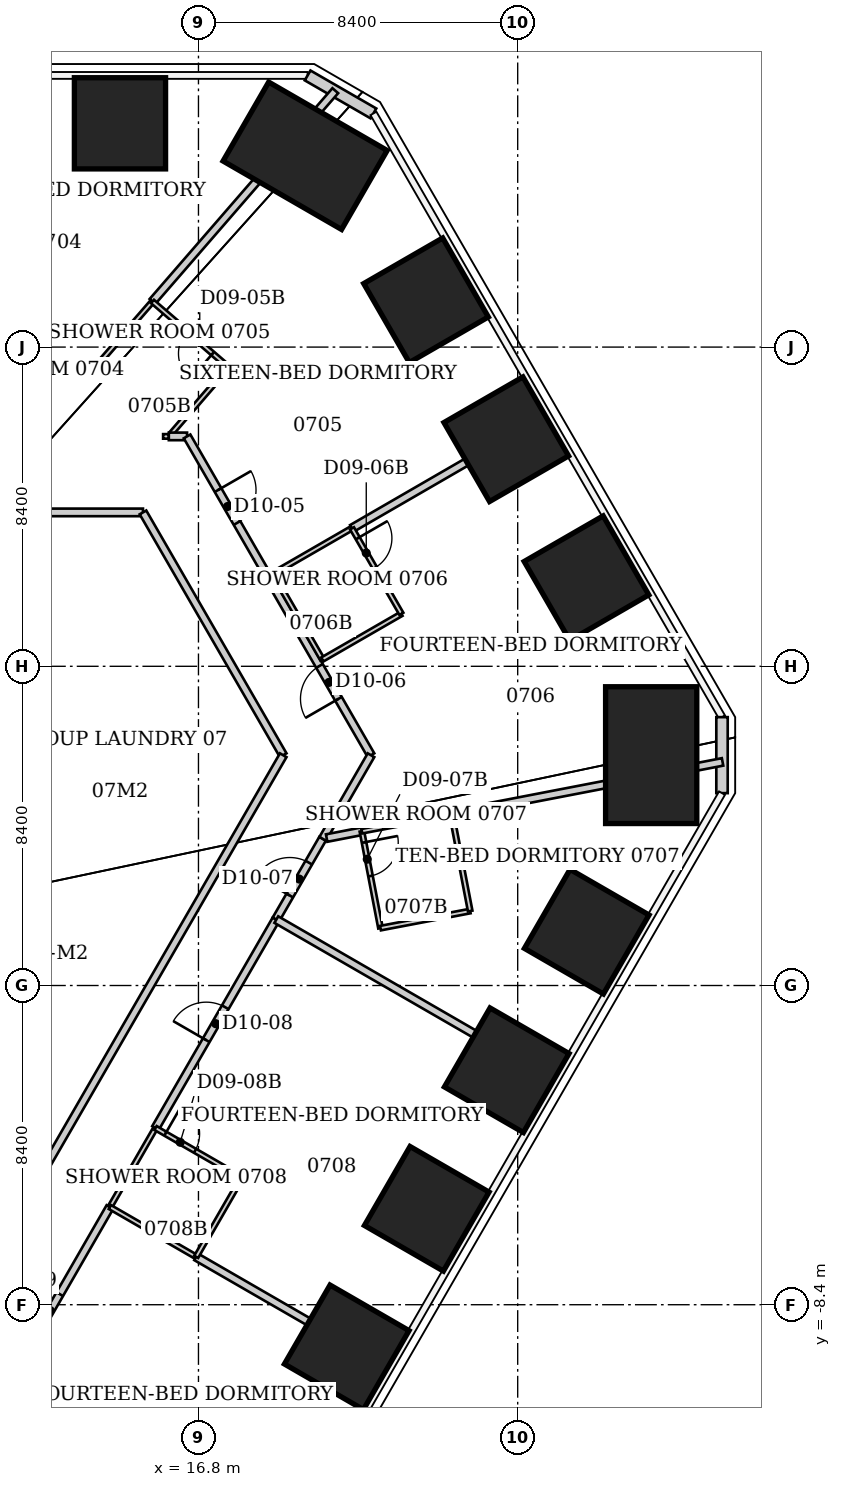
"""IFC4 building model, lengths in metres.
Left out: names, types, materials, properties, quantities, classifications, styles, units other than length and angle.
Written with IfcOpenShell. Run it as: python <this file> out.ifc"""

import sys

from ifc_helpers import new_model, si_unit, direction, frame, frame_2d, origin, origin_2d, place, context, subcontext, project, spatial, rectangle, extrude, element, fill, save


model = new_model("IFC4")
c1 = context("Model", 3, precision=1e-05, world=origin(), true_north=direction((0.0, 1.0)))
c2 = subcontext(c1, "Body", "Model", "MODEL_VIEW")
j1 = project(units=[si_unit("LENGTHUNIT", "METRE"), si_unit("PLANEANGLEUNIT", "RADIAN")], contexts=[c1])
p1 = place(None, origin())
s1 = spatial("IfcSite", under=j1, at=p1, CompositionType="ELEMENT")
p2 = place(p1, origin())
s2 = spatial("IfcBuilding", under=s1, at=p2, CompositionType="ELEMENT")
p3 = place(p2, frame((0.0, 0.0, 34.4)))
s3 = spatial("IfcBuildingStorey", under=s2, at=p3, CompositionType="ELEMENT", Elevation=34.4)
p4 = place(p3, frame((14.735, 22.689, 0.0), z_axis=(0.0, 0.0, 1.0), x_axis=(0.0, 1.0, 0.0)))
e1 = element("IfcColumn", 1, at=p4, inside=s3, PredefinedType="COLUMN", context=c2, shape_type="SweptSolid", body=[
    extrude(rectangle(XDim=2.4, YDim=2.4, at=origin_2d()), origin(), (0.0, 0.0, 1.0), 3.8),
])
p5 = place(p3, frame((19.606, 21.835, 0.0), z_axis=(0.0, 0.0, 1.0), x_axis=(0.5, 0.866025403784, 0.0)))
e2 = element("IfcColumn", 2, at=p5, inside=s3, PredefinedType="COLUMN", context=c2, shape_type="SweptSolid", body=[
    extrude(rectangle(XDim=2.4, YDim=3.6, at=origin_2d()), origin(), (0.0, 0.0, 1.0), 3.8),
])
for number, where, z_axis, x_axis in (
    (3, (22.788, 18.032, 0.0), (0.0, 0.0, 1.0), (0.866, 0.5, 0.0)),
    (4, (24.899, 14.375, 0.0), (0.0, 0.0, 1.0), (0.866, 0.5, 0.0)),
    (5, (27.01, 10.719, 0.0), (0.0, 0.0, 1.0), (0.866, 0.5, 0.0)),
):
    element("IfcColumn", number, at=place(p3, frame(where, z_axis=z_axis, x_axis=x_axis)), inside=s3, PredefinedType="COLUMN", context=c2, shape_type="SweptSolid", body=[
        extrude(rectangle(XDim=2.4, YDim=2.4, at=origin_2d()), origin(), (0.0, 0.0, 1.0), 3.8),
    ])
p6 = place(p3, frame((28.713, 6.062, 0.0), z_axis=(0.0, 0.0, 1.0), x_axis=(1.0, 0.0, 0.0)))
e6 = element("IfcColumn", 6, at=p6, inside=s3, PredefinedType="COLUMN", context=c2, shape_type="SweptSolid", body=[
    extrude(rectangle(XDim=2.4, YDim=3.6, at=origin_2d()), origin(), (0.0, 0.0, 1.0), 3.8),
])
for number, where, z_axis, x_axis in (
    (7, (27.016, 1.416, 0.0), (0.0, 0.0, 1.0), (0.866, -0.5, 0.0)),
    (8, (24.911, -2.23, 0.0), (0.0, 0.0, 1.0), (0.866, -0.5, 0.0)),
    (9, (22.806, -5.875, 0.0), (0.0, 0.0, 1.0), (0.866, -0.5, 0.0)),
    (10, (20.701, -9.521, 0.0), (0.0, 0.0, 1.0), (0.866, -0.5, 0.0)),
):
    element("IfcColumn", number, at=place(p3, frame(where, z_axis=z_axis, x_axis=x_axis)), inside=s3, PredefinedType="COLUMN", context=c2, shape_type="SweptSolid", body=[
        extrude(rectangle(XDim=2.4, YDim=2.4, at=origin_2d()), origin(), (0.0, 0.0, 1.0), 3.8),
    ])
for number, where, z_axis, x_axis in (
    (11, (19.672, 23.949, 0.0), (0.0, 0.0, 1.0), (0.866, -0.5, 0.0)),
    (12, (30.576, 7.062, 0.0), (0.0, 0.0, 1.0), (0.0, -1.0, 0.0)),
):
    element("IfcWall", number, at=place(p3, frame(where, z_axis=z_axis, x_axis=x_axis)), inside=s3, PredefinedType="SOLIDWALL", context=c2, shape_type="SweptSolid", body=[
        extrude(rectangle(XDim=2.0, YDim=0.3, at=frame_2d((1.0, 0.0))), origin(), (0.0, 0.0, 1.0), 3.64),
    ])
p7 = place(p3, frame((0.15, 12.45, 0.0), z_axis=(0.0, 0.0, 1.0), x_axis=(1.0, 0.0, 0.0)))
e13 = element("IfcWall", 13, at=p7, inside=s3, PredefinedType="PARTITIONING", context=c2, shape_type="SweptSolid", body=[
    extrude(rectangle(XDim=15.19, YDim=0.2, at=frame_2d((7.595, 0.0))), origin(), (0.0, 0.0, 1.0), 3.64),
])
p8 = place(p3, frame((11.33, -11.28, 0.0), z_axis=(0.0, 0.0, 1.0), x_axis=(0.499208241022, 0.866482043724, 0.0)))
e14 = element("IfcWall", 14, at=p8, inside=s3, PredefinedType="PARTITIONING", context=c2, shape_type="SweptSolid", body=[
    extrude(rectangle(XDim=6.29, YDim=0.2, at=frame_2d((3.145, 0.0))), origin(), (0.0, 0.0, 1.0), 3.64),
])
p9 = place(p8, frame((2.645, 0.0, 0.0)))
e15 = element("IfcOpeningElement", 15, at=p9, cuts=e14, PredefinedType="OPENING", context=c2, shape_type="SweptSolid", body=[
    extrude(rectangle(XDim=1.0, YDim=2.13, at=frame_2d((0.5, 1.065))), frame((0.0, 0.1, 0.0), z_axis=(0.0, -1.0, 0.0), x_axis=(1.0, 0.0, 0.0)), (0.0, 0.0, 1.0), 0.2),
])
p10 = place(p3, frame((13.95, 16.11, 0.0), z_axis=(0.0, 0.0, 1.0), x_axis=(0.655390967201, 0.75528979876, 0.0)))
e16 = element("IfcWall", 16, at=p10, inside=s3, PredefinedType="PARTITIONING", context=c2, shape_type="SweptSolid", body=[
    extrude(rectangle(XDim=2.502, YDim=0.12, at=frame_2d((1.251, 0.0))), origin(), (0.0, 0.0, 1.0), 3.64),
])
p11 = place(p3, frame((14.47, -5.83, 0.0), z_axis=(0.0, 0.0, 1.0), x_axis=(0.499693115345, 0.866202511239, 0.0)))
e17 = element("IfcWall", 17, at=p11, inside=s3, PredefinedType="PARTITIONING", context=c2, shape_type="SweptSolid", body=[
    extrude(rectangle(XDim=2.401, YDim=0.12, at=frame_2d((1.201, 0.0))), origin(), (0.0, 0.0, 1.0), 3.64),
])
p12 = place(p3, frame((14.47, -5.83, 0.0), z_axis=(0.0, 0.0, 1.0), x_axis=(0.866010296064, -0.500026166427, 0.0)))
e18 = element("IfcWall", 18, at=p12, inside=s3, PredefinedType="PARTITIONING", context=c2, shape_type="SweptSolid", body=[
    extrude(rectangle(XDim=2.621, YDim=0.12, at=frame_2d((1.311, 0.0))), origin(), (0.0, 0.0, 1.0), 3.023),
])
p13 = place(p3, frame((15.34, 12.45, 0.0), z_axis=(0.0, 0.0, 1.0), x_axis=(0.500074726567, -0.865982256082, 0.0)))
e19 = element("IfcWall", 19, at=p13, inside=s3, PredefinedType="PARTITIONING", context=c2, shape_type="SweptSolid", body=[
    extrude(rectangle(XDim=7.379, YDim=0.2, at=frame_2d((3.689, 0.0))), origin(), (0.0, 0.0, 1.0), 3.64),
])
p14 = place(p3, frame((15.59, 18.0, 0.0), z_axis=(0.0, 0.0, 1.0), x_axis=(0.655131789558, 0.755514618197, 0.0)))
e20 = element("IfcWall", 20, at=p14, inside=s3, PredefinedType="PARTITIONING", context=c2, shape_type="SweptSolid", body=[
    extrude(rectangle(XDim=7.343, YDim=0.2, at=frame_2d((3.671, 0.0))), origin(), (0.0, 0.0, 1.0), 3.64),
])
p15 = place(p3, frame((15.67, -3.75, 0.0), z_axis=(0.0, 0.0, 1.0), x_axis=(0.500061360627, 0.865989974311, 0.0)))
e21 = element("IfcWall", 21, at=p15, inside=s3, PredefinedType="PARTITIONING", context=c2, shape_type="SweptSolid", body=[
    extrude(rectangle(XDim=6.34, YDim=0.2, at=frame_2d((3.17, 0.0))), origin(), (0.0, 0.0, 1.0), 3.64),
])
p16 = place(p15, frame((2.67, 0.0, 0.0)))
e22 = element("IfcOpeningElement", 22, at=p16, cuts=e21, PredefinedType="OPENING", context=c2, shape_type="SweptSolid", body=[
    extrude(rectangle(XDim=1.0, YDim=2.13, at=frame_2d((0.5, 1.065))), frame((0.0, 0.1, 0.0), z_axis=(0.0, -1.0, 0.0), x_axis=(1.0, 0.0, 0.0)), (0.0, 0.0, 1.0), 0.2),
])
p17 = place(p3, frame((16.02, 14.45, 0.0), z_axis=(0.0, 0.0, 1.0), x_axis=(-1.0, 0.0, 0.0)))
e23 = element("IfcWall", 23, at=p17, inside=s3, PredefinedType="PARTITIONING", context=c2, shape_type="SweptSolid", body=[
    extrude(rectangle(XDim=0.15, YDim=0.12, at=frame_2d((0.075, 0.0))), origin(), (0.0, 0.0, 1.0), 3.64),
])
p18 = place(p3, frame((16.082, 14.522, 0.0), z_axis=(0.0, 0.0, 1.0), x_axis=(0.653217802971, 0.757170061401, 0.0)))
e24 = element("IfcWall", 24, at=p18, inside=s3, PredefinedType="PARTITIONING", context=c2, shape_type="SweptSolid", body=[
    extrude(rectangle(XDim=2.309, YDim=0.12, at=frame_2d((1.154, 0.0))), origin(), (0.0, 0.0, 1.0), 3.64),
])
p19 = place(p3, frame((16.5, 14.45, 0.0), z_axis=(0.0, 0.0, 1.0), x_axis=(-1.0, 0.0, 0.0)))
e25 = element("IfcWall", 25, at=p19, inside=s3, PredefinedType="PARTITIONING", context=c2, shape_type="SweptSolid", body=[
    extrude(rectangle(XDim=0.48, YDim=0.2, at=frame_2d((0.24, 0.0))), origin(), (0.0, 0.0, 1.0), 3.64),
])
p20 = place(p3, frame((16.5, 14.45, 0.0), z_axis=(0.0, 0.0, 1.0), x_axis=(0.499689380994, -0.866204665493, 0.0)))
e26 = element("IfcWall", 26, at=p20, inside=s3, PredefinedType="PARTITIONING", context=c2, shape_type="SweptSolid", body=[
    extrude(rectangle(XDim=4.26, YDim=0.2, at=frame_2d((2.13, 0.0))), origin(), (0.0, 0.0, 1.0), 3.64),
])
p21 = place(p20, frame((1.63, 0.0, 0.0)))
e27 = element("IfcOpeningElement", 27, at=p21, cuts=e26, PredefinedType="OPENING", context=c2, shape_type="SweptSolid", body=[
    extrude(rectangle(XDim=1.0, YDim=2.13, at=frame_2d((0.5, 1.065))), frame((0.0, 0.1, 0.0), z_axis=(0.0, -1.0, 0.0), x_axis=(1.0, 0.0, 0.0)), (0.0, 0.0, 1.0), 0.2),
])
p22 = place(p3, frame((16.74, -7.141, 0.0), z_axis=(0.0, 0.0, 1.0), x_axis=(0.865985044037, -0.500069898618, 0.0)))
e28 = element("IfcWall", 28, at=p22, inside=s3, PredefinedType="PARTITIONING", context=c2, shape_type="SweptSolid", body=[
    extrude(rectangle(XDim=5.758, YDim=0.2, at=frame_2d((2.879, 0.0))), origin(), (0.0, 0.0, 1.0), 3.023),
])
p23 = place(p3, frame((16.74, -7.14, 0.0), z_axis=(0.0, 0.0, 1.0), x_axis=(0.499737123639, 0.866177122335, 0.0)))
e29 = element("IfcWall", 29, at=p23, inside=s3, PredefinedType="PARTITIONING", context=c2, shape_type="SweptSolid", body=[
    extrude(rectangle(XDim=2.401, YDim=0.12, at=frame_2d((1.201, 0.0))), origin(), (0.0, 0.0, 1.0), 3.64),
])
p24 = place(p3, frame((17.59, 16.27, 0.0), z_axis=(0.0, 0.0, 1.0), x_axis=(-0.756316256301, 0.6542061758, 0.0)))
e30 = element("IfcWall", 30, at=p24, inside=s3, PredefinedType="PARTITIONING", context=c2, shape_type="SweptSolid", body=[
    extrude(rectangle(XDim=2.644, YDim=0.12, at=frame_2d((1.322, 0.0))), origin(), (0.0, 0.0, 1.0), 3.64),
])
p25 = place(p24, frame((0.55, 0.0, 0.0)))
e31 = element("IfcOpeningElement", 31, at=p25, cuts=e30, PredefinedType="OPENING", context=c2, shape_type="SweptSolid", body=[
    extrude(rectangle(XDim=0.9, YDim=2.03, at=frame_2d((0.45, 1.015))), frame((0.0, 0.06, 0.0), z_axis=(0.0, -1.0, 0.0), x_axis=(1.0, 0.0, 0.0)), (0.0, 0.0, 1.0), 0.12),
])
p26 = place(p3, frame((17.94, -5.06, 0.0), z_axis=(0.0, 0.0, 1.0), x_axis=(-0.866114241029, 0.499846097802, 0.0)))
e32 = element("IfcWall", 32, at=p26, inside=s3, PredefinedType="PARTITIONING", context=c2, shape_type="SweptSolid", body=[
    extrude(rectangle(XDim=2.621, YDim=0.12, at=frame_2d((1.311, 0.0))), origin(), (0.0, 0.0, 1.0), 3.64),
])
p27 = place(p26, frame((1.421, 0.0, 0.0)))
e33 = element("IfcOpeningElement", 33, at=p27, cuts=e32, PredefinedType="OPENING", context=c2, shape_type="SweptSolid", body=[
    extrude(rectangle(XDim=0.9, YDim=2.03, at=frame_2d((0.45, 1.015))), frame((0.0, 0.06, 0.0), z_axis=(0.0, -1.0, 0.0), x_axis=(1.0, 0.0, 0.0)), (0.0, 0.0, 1.0), 0.12),
])
p28 = place(p3, frame((18.629, 10.76, 0.0), z_axis=(0.0, 0.0, 1.0), x_axis=(0.499715960807, -0.866189331794, 0.0)))
e34 = element("IfcWall", 34, at=p28, inside=s3, PredefinedType="PARTITIONING", context=c2, shape_type="SweptSolid", body=[
    extrude(rectangle(XDim=5.426, YDim=0.2, at=frame_2d((2.713, 0.0))), origin(), (0.0, 0.0, 1.0), 3.64),
])
p29 = place(p28, frame((2.713, 0.0, 0.0)))
e35 = element("IfcOpeningElement", 35, at=p29, cuts=e34, PredefinedType="OPENING", context=c2, shape_type="SweptSolid", body=[
    extrude(rectangle(XDim=1.0, YDim=2.13, at=frame_2d((0.5, 1.065))), frame((0.0, 0.1, 0.0), z_axis=(0.0, -1.0, 0.0), x_axis=(1.0, 0.0, 0.0)), (0.0, 0.0, 1.0), 0.2),
])
p30 = place(p3, frame((18.639, 10.765, 0.0), z_axis=(0.0, 0.0, 1.0), x_axis=(0.865830913258, 0.500336716268, 0.0)))
e36 = element("IfcWall", 36, at=p30, inside=s3, PredefinedType="PARTITIONING", context=c2, shape_type="SweptSolid", body=[
    extrude(rectangle(XDim=0.138, YDim=0.2, at=frame_2d((0.069, 0.0))), origin(), (0.0, 0.0, 1.0), 3.64),
])
p31 = place(p3, frame((18.758, 10.834, 0.0), z_axis=(0.0, 0.0, 1.0), x_axis=(0.865975636842, 0.500086188968, 0.0)))
e37 = element("IfcWall", 37, at=p31, inside=s3, PredefinedType="PARTITIONING", context=c2, shape_type="SweptSolid", body=[
    extrude(rectangle(XDim=2.401, YDim=0.12, at=frame_2d((1.201, 0.0))), origin(), (0.0, 0.0, 1.0), 2.86),
])
p32 = place(p3, frame((18.76, 10.83, 0.0), z_axis=(0.0, 0.0, 1.0), x_axis=(0.500291685314, -0.865856933682, 0.0)))
e38 = element("IfcWall", 38, at=p32, inside=s3, PredefinedType="PARTITIONING", context=c2, shape_type="SweptSolid", body=[
    extrude(rectangle(XDim=2.599, YDim=0.12, at=frame_2d((1.299, 0.0))), origin(), (0.0, 0.0, 1.0), 3.64),
])
p33 = place(p3, frame((18.84, 1.74, 0.0), z_axis=(0.0, 0.0, 1.0), x_axis=(0.500348958043, 0.865823839003, 0.0)))
e39 = element("IfcWall", 39, at=p33, inside=s3, PredefinedType="PARTITIONING", context=c2, shape_type="SweptSolid", body=[
    extrude(rectangle(XDim=2.451, YDim=0.2, at=frame_2d((1.226, 0.0))), origin(), (0.0, 0.0, 1.0), 3.64),
])
p34 = place(p33, frame((0.726, 0.0, 0.0)))
e40 = element("IfcOpeningElement", 40, at=p34, cuts=e39, PredefinedType="OPENING", context=c2, shape_type="SweptSolid", body=[
    extrude(rectangle(XDim=1.0, YDim=2.13, at=frame_2d((0.5, 1.065))), frame((0.0, 0.1, 0.0), z_axis=(0.0, -1.0, 0.0), x_axis=(1.0, 0.0, 0.0)), (0.0, 0.0, 1.0), 0.2),
])
p35 = place(p3, frame((19.03, 6.06, 0.0), z_axis=(0.0, 0.0, 1.0), x_axis=(-0.500049636372, -0.865996744315, 0.0)))
e41 = element("IfcWall", 41, at=p35, inside=s3, PredefinedType="PARTITIONING", context=c2, shape_type="SweptSolid", body=[
    extrude(rectangle(XDim=15.739, YDim=0.2, at=frame_2d((7.869, 0.0))), origin(), (0.0, 0.0, 1.0), 3.64),
])
p36 = place(p3, frame((20.06, 8.58, 0.0), z_axis=(0.0, 0.0, 1.0), x_axis=(0.866177122335, 0.499737123639, 0.0)))
e42 = element("IfcWall", 42, at=p36, inside=s3, PredefinedType="PARTITIONING", context=c2, shape_type="SweptSolid", body=[
    extrude(rectangle(XDim=2.401, YDim=0.12, at=frame_2d((1.201, 0.0))), origin(), (0.0, 0.0, 1.0), 3.64),
])
p37 = place(p3, frame((20.07, 3.86, 0.0), z_axis=(0.0, 0.0, 1.0), x_axis=(0.499963722229, 0.866046347752, 0.0)))
e43 = element("IfcWall", 43, at=p37, inside=s3, PredefinedType="PARTITIONING", context=c2, shape_type="SweptSolid", body=[
    extrude(rectangle(XDim=2.54, YDim=0.2, at=frame_2d((1.27, 0.0))), origin(), (0.0, 0.0, 1.0), 3.64),
])
p38 = place(p3, frame((20.173, 3.88, 0.0), z_axis=(0.0, 0.0, 1.0), x_axis=(0.981669186859, 0.19059277943, 0.0)))
e44 = element("IfcWall", 44, at=p38, inside=s3, PredefinedType="PARTITIONING", context=c2, shape_type="SweptSolid", body=[
    extrude(rectangle(XDim=0.944, YDim=0.2, at=frame_2d((0.472, 0.0))), origin(), (0.0, 0.0, 1.0), 3.64),
])
p39 = place(p3, frame((20.84, 12.03, 0.0), z_axis=(0.0, 0.0, 1.0), x_axis=(0.865529484494, 0.50085797535, 0.0)))
e45 = element("IfcWall", 45, at=p39, inside=s3, PredefinedType="PARTITIONING", context=c2, shape_type="SweptSolid", body=[
    extrude(rectangle(XDim=5.83, YDim=0.2, at=frame_2d((2.915, 0.0))), origin(), (0.0, 0.0, 1.0), 2.86),
])
p40 = place(p3, frame((21.1, 4.06, 0.0), z_axis=(0.0, 0.0, 1.0), x_axis=(0.188697442844, -0.982035271802, 0.0)))
e46 = element("IfcWall", 46, at=p40, inside=s3, PredefinedType="PARTITIONING", context=c2, shape_type="SweptSolid", body=[
    extrude(rectangle(XDim=2.597, YDim=0.12, at=frame_2d((1.298, 0.0))), origin(), (0.0, 0.0, 1.0), 3.64),
])
p41 = place(p40, frame((0.3, 0.0, 0.0)))
e47 = element("IfcOpeningElement", 47, at=p41, cuts=e46, PredefinedType="OPENING", context=c2, shape_type="SweptSolid", body=[
    extrude(rectangle(XDim=0.9, YDim=2.03, at=frame_2d((0.45, 1.015))), frame((0.0, 0.06, 0.0), z_axis=(0.0, -1.0, 0.0), x_axis=(1.0, 0.0, 0.0)), (0.0, 0.0, 1.0), 0.12),
])
p42 = place(p3, frame((21.1, 4.06, 0.0), z_axis=(0.0, 0.0, 1.0), x_axis=(0.982307423658, 0.187275533444, 0.0)))
e48 = element("IfcWall", 48, at=p42, inside=s3, PredefinedType="PARTITIONING", context=c2, shape_type="SweptSolid", body=[
    extrude(rectangle(XDim=2.403, YDim=0.12, at=frame_2d((1.201, 0.0))), origin(), (0.0, 0.0, 1.0), 3.64),
])
p43 = place(p3, frame((21.59, 1.51, 0.0), z_axis=(0.0, 0.0, 1.0), x_axis=(0.982303859288, 0.187294228499, 0.0)))
e49 = element("IfcWall", 49, at=p43, inside=s3, PredefinedType="PARTITIONING", context=c2, shape_type="SweptSolid", body=[
    extrude(rectangle(XDim=2.402, YDim=0.12, at=frame_2d((1.201, 0.0))), origin(), (0.0, 0.0, 1.0), 3.64),
])
p44 = place(p3, frame((22.14, 9.78, 0.0), z_axis=(0.0, 0.0, 1.0), x_axis=(-0.500221244143, 0.865897630733, 0.0)))
e50 = element("IfcWall", 50, at=p44, inside=s3, PredefinedType="PARTITIONING", context=c2, shape_type="SweptSolid", body=[
    extrude(rectangle(XDim=2.598, YDim=0.12, at=frame_2d((1.299, 0.0))), origin(), (0.0, 0.0, 1.0), 3.64),
])
p45 = place(p44, frame((1.399, 0.0, 0.0)))
e51 = element("IfcOpeningElement", 51, at=p45, cuts=e50, PredefinedType="OPENING", context=c2, shape_type="SweptSolid", body=[
    extrude(rectangle(XDim=0.9, YDim=2.03, at=frame_2d((0.45, 1.015))), frame((0.0, 0.06, 0.0), z_axis=(0.0, -1.0, 0.0), x_axis=(1.0, 0.0, 0.0)), (0.0, 0.0, 1.0), 0.12),
])
p46 = place(p3, frame((23.46, 4.51, 0.0), z_axis=(0.0, 0.0, 1.0), x_axis=(0.981929870864, 0.189245155035, 0.0)))
e52 = element("IfcWall", 52, at=p46, inside=s3, PredefinedType="PARTITIONING", context=c2, shape_type="SweptSolid", body=[
    extrude(rectangle(XDim=7.262, YDim=0.2, at=frame_2d((3.631, 0.0))), origin(), (0.0, 0.0, 1.0), 3.64),
])
p47 = place(p3, frame((23.95, 1.96, 0.0), z_axis=(0.0, 0.0, 1.0), x_axis=(-0.188697442844, 0.982035271802, 0.0)))
e53 = element("IfcWall", 53, at=p47, inside=s3, PredefinedType="PARTITIONING", context=c2, shape_type="SweptSolid", body=[
    extrude(rectangle(XDim=2.597, YDim=0.12, at=frame_2d((1.298, 0.0))), origin(), (0.0, 0.0, 1.0), 3.64),
])
p48 = place(p3, frame((26.096, -2.45, 0.0), z_axis=(0.0, 0.0, 1.0), x_axis=(-0.866002919298, 0.500038942252, 0.0)))
e54 = element("IfcWall", 54, at=p48, inside=s3, PredefinedType="PARTITIONING", context=c2, shape_type="SweptSolid", body=[
    extrude(rectangle(XDim=8.369, YDim=0.2, at=frame_2d((4.185, 0.0))), origin(), (0.0, 0.0, 1.0), 3.64),
])
p49 = place(p21, origin())
e55 = element("IfcDoor", 55, at=p49, inside=s3, OperationType="SINGLE_SWING_LEFT", PredefinedType="DOOR", context=c2, shape_type="SweptSolid", body=[
    extrude(rectangle(XDim=1.0, YDim=2.13, at=frame_2d((0.5, 1.065))), frame((0.0, 0.025, 0.0), z_axis=(0.0, -1.0, 0.0), x_axis=(1.0, 0.0, 0.0)), (0.0, 0.0, 1.0), 0.05),
])
fill(e27, e55)
p50 = place(p25, origin())
e56 = element("IfcDoor", 56, at=p50, inside=s3, OperationType="SINGLE_SWING_LEFT", PredefinedType="DOOR", context=c2, shape_type="SweptSolid", body=[
    extrude(rectangle(XDim=0.9, YDim=2.03, at=frame_2d((0.45, 1.015))), frame((0.0, 0.025, 0.0), z_axis=(0.0, -1.0, 0.0), x_axis=(1.0, 0.0, 0.0)), (0.0, 0.0, 1.0), 0.05),
])
fill(e31, e56)
p51 = place(p29, origin())
e57 = element("IfcDoor", 57, at=p51, inside=s3, OperationType="SINGLE_SWING_RIGHT", PredefinedType="DOOR", context=c2, shape_type="SweptSolid", body=[
    extrude(rectangle(XDim=1.0, YDim=2.13, at=frame_2d((0.5, 1.065))), frame((0.0, 0.025, 0.0), z_axis=(0.0, -1.0, 0.0), x_axis=(1.0, 0.0, 0.0)), (0.0, 0.0, 1.0), 0.05),
])
fill(e35, e57)
p52 = place(p45, origin())
e58 = element("IfcDoor", 58, at=p52, inside=s3, OperationType="SINGLE_SWING_RIGHT", PredefinedType="DOOR", context=c2, shape_type="SweptSolid", body=[
    extrude(rectangle(XDim=0.9, YDim=2.03, at=frame_2d((0.45, 1.015))), frame((0.0, 0.025, 0.0), z_axis=(0.0, -1.0, 0.0), x_axis=(1.0, 0.0, 0.0)), (0.0, 0.0, 1.0), 0.05),
])
fill(e51, e58)
p53 = place(p34, origin())
e59 = element("IfcDoor", 59, at=p53, inside=s3, OperationType="SINGLE_SWING_LEFT", PredefinedType="DOOR", context=c2, shape_type="SweptSolid", body=[
    extrude(rectangle(XDim=1.0, YDim=2.13, at=frame_2d((0.5, 1.065))), frame((0.0, 0.025, 0.0), z_axis=(0.0, -1.0, 0.0), x_axis=(1.0, 0.0, 0.0)), (0.0, 0.0, 1.0), 0.05),
])
fill(e40, e59)
p54 = place(p41, origin())
e60 = element("IfcDoor", 60, at=p54, inside=s3, OperationType="SINGLE_SWING_LEFT", PredefinedType="DOOR", context=c2, shape_type="SweptSolid", body=[
    extrude(rectangle(XDim=0.9, YDim=2.03, at=frame_2d((0.45, 1.015))), frame((0.0, 0.025, 0.0), z_axis=(0.0, -1.0, 0.0), x_axis=(1.0, 0.0, 0.0)), (0.0, 0.0, 1.0), 0.05),
])
fill(e47, e60)
p55 = place(p16, origin())
e61 = element("IfcDoor", 61, at=p55, inside=s3, OperationType="SINGLE_SWING_LEFT", PredefinedType="DOOR", context=c2, shape_type="SweptSolid", body=[
    extrude(rectangle(XDim=1.0, YDim=2.13, at=frame_2d((0.5, 1.065))), frame((0.0, 0.025, 0.0), z_axis=(0.0, -1.0, 0.0), x_axis=(1.0, 0.0, 0.0)), (0.0, 0.0, 1.0), 0.05),
])
fill(e22, e61)
p56 = place(p27, origin())
e62 = element("IfcDoor", 62, at=p56, inside=s3, OperationType="SINGLE_SWING_RIGHT", PredefinedType="DOOR", context=c2, shape_type="SweptSolid", body=[
    extrude(rectangle(XDim=0.9, YDim=2.03, at=frame_2d((0.45, 1.015))), frame((0.0, 0.025, 0.0), z_axis=(0.0, -1.0, 0.0), x_axis=(1.0, 0.0, 0.0)), (0.0, 0.0, 1.0), 0.05),
])
fill(e33, e62)
p57 = place(p9, origin())
e63 = element("IfcDoor", 63, at=p57, inside=s3, OperationType="SINGLE_SWING_LEFT", PredefinedType="DOOR", context=c2, shape_type="SweptSolid", body=[
    extrude(rectangle(XDim=1.0, YDim=2.13, at=frame_2d((0.5, 1.065))), frame((0.0, 0.025, 0.0), z_axis=(0.0, -1.0, 0.0), x_axis=(1.0, 0.0, 0.0)), (0.0, 0.0, 1.0), 0.05),
])
fill(e15, e63)
save(model, sys.argv[1])
